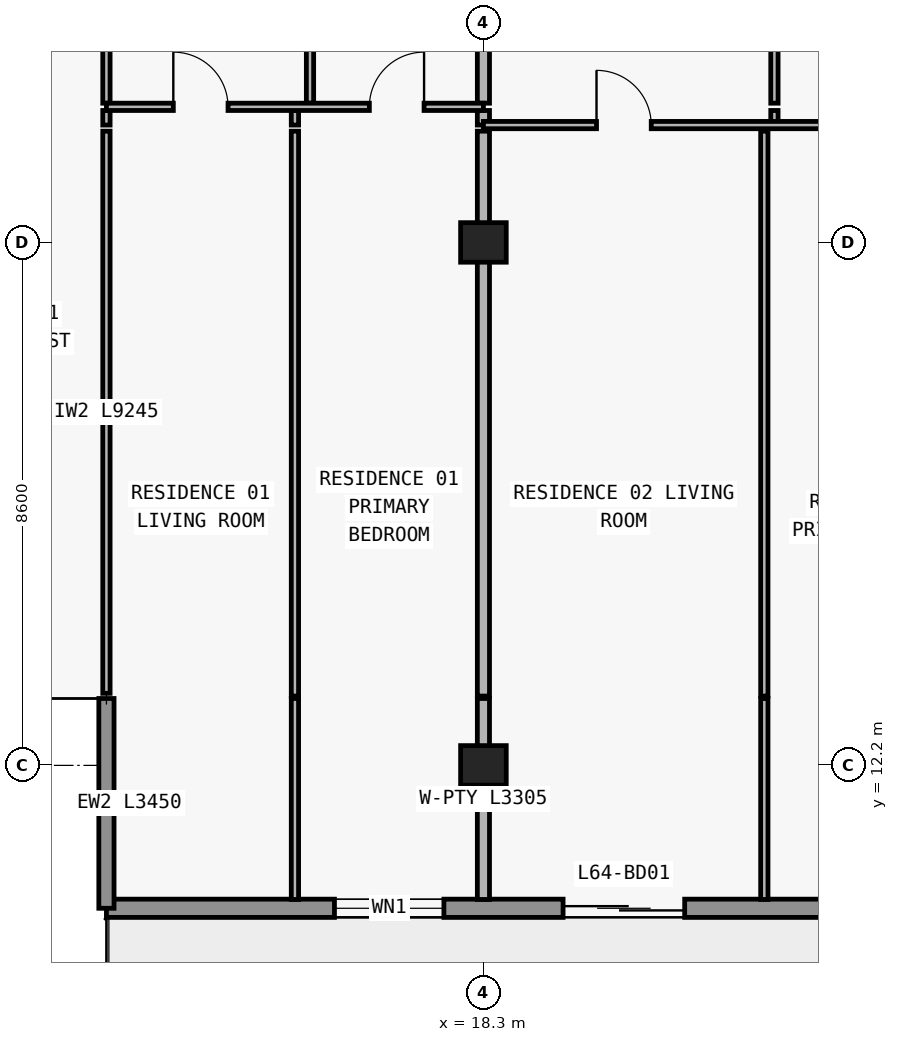
"""IFC4 building model, lengths in metres.
Left out: names, types, materials, properties, quantities, classifications, styles, units other than length and angle.
Written with IfcOpenShell. Run it as: python <this file> out.ifc"""

import sys

from ifc_helpers import new_model, si_unit, direction, frame, frame_2d, origin, origin_2d, place, context, subcontext, project, spatial, rectangle, extrude, element, fill, save


model = new_model("IFC4")
c1 = context("Model", 3, precision=1e-05, world=origin(), true_north=direction((0.0, 1.0)))
c2 = subcontext(c1, "Body", "Model", "MODEL_VIEW")
j1 = project(units=[si_unit("LENGTHUNIT", "METRE"), si_unit("PLANEANGLEUNIT", "RADIAN")], contexts=[c1])
p1 = place(None, origin())
s1 = spatial("IfcSite", under=j1, at=p1, CompositionType="ELEMENT")
p2 = place(p1, origin())
s2 = spatial("IfcBuilding", under=s1, at=p2, CompositionType="ELEMENT")
p3 = place(p2, frame((0.0, 0.0, 229.8)))
s3 = spatial("IfcBuildingStorey", under=s2, at=p3, CompositionType="ELEMENT", Elevation=229.8)
for number, where, z_axis, x_axis in (
    (1, (18.3, 12.2, 0.0), (0.0, 0.0, 1.0), (1.0, 0.0, 0.0)),
    (2, (18.3, 20.8, 0.0), (0.0, 0.0, 1.0), (1.0, 0.0, 0.0)),
):
    element("IfcColumn", number, at=place(p3, frame(where, z_axis=z_axis, x_axis=x_axis)), inside=s3, PredefinedType="COLUMN", context=c2, shape_type="SweptSolid", body=[
        extrude(rectangle(XDim=0.75, YDim=0.65, at=origin_2d()), origin(), (0.0, 0.0, 1.0), 3.05),
    ])
p4 = place(p3, frame((65.7, 9.85, 0.0), z_axis=(0.0, 0.0, 1.0), x_axis=(-1.0, 0.0, 0.0)))
e3 = element("IfcWall", 3, at=p4, inside=s3, PredefinedType="STANDARD", context=c2, shape_type="SweptSolid", body=[
    extrude(rectangle(XDim=53.6, YDim=0.3, at=frame_2d((26.8, 0.0))), origin(), (0.0, 0.0, 1.0), 3.05),
])
p5 = place(p4, frame((48.05, 0.0, 0.85)))
e4 = element("IfcOpeningElement", 4, at=p5, cuts=e3, PredefinedType="OPENING", context=c2, shape_type="SweptSolid", body=[
    extrude(rectangle(XDim=1.8, YDim=1.55, at=frame_2d((0.9, 0.775))), frame((0.0, 0.16, 0.0), z_axis=(0.0, -1.0, 0.0), x_axis=(1.0, 0.0, 0.0)), (0.0, 0.0, 1.0), 0.32),
])
p6 = place(p4, frame((44.09, 0.0, 0.0)))
e5 = element("IfcOpeningElement", 5, at=p6, cuts=e3, PredefinedType="OPENING", context=c2, shape_type="SweptSolid", body=[
    extrude(rectangle(XDim=2.0, YDim=2.3, at=frame_2d((1.0, 1.15))), frame((0.0, 0.16, 0.0), z_axis=(0.0, -1.0, 0.0), x_axis=(1.0, 0.0, 0.0)), (0.0, 0.0, 1.0), 0.32),
])
p7 = place(p4, frame((39.99, 0.0, 0.85)))
e6 = element("IfcOpeningElement", 6, at=p7, cuts=e3, PredefinedType="OPENING", context=c2, shape_type="SweptSolid", body=[
    extrude(rectangle(XDim=1.8, YDim=1.55, at=frame_2d((0.9, 0.775))), frame((0.0, 0.16, 0.0), z_axis=(0.0, -1.0, 0.0), x_axis=(1.0, 0.0, 0.0)), (0.0, 0.0, 1.0), 0.32),
])
p8 = place(p4, frame((36.026, 0.0, 0.0)))
e7 = element("IfcOpeningElement", 7, at=p8, cuts=e3, PredefinedType="OPENING", context=c2, shape_type="SweptSolid", body=[
    extrude(rectangle(XDim=2.0, YDim=2.3, at=frame_2d((1.0, 1.15))), frame((0.0, 0.16, 0.0), z_axis=(0.0, -1.0, 0.0), x_axis=(1.0, 0.0, 0.0)), (0.0, 0.0, 1.0), 0.32),
])
p9 = place(p4, frame((31.726, 0.0, 0.85)))
e8 = element("IfcOpeningElement", 8, at=p9, cuts=e3, PredefinedType="OPENING", context=c2, shape_type="SweptSolid", body=[
    extrude(rectangle(XDim=2.2, YDim=1.55, at=frame_2d((1.1, 0.775))), frame((0.0, 0.16, 0.0), z_axis=(0.0, -1.0, 0.0), x_axis=(1.0, 0.0, 0.0)), (0.0, 0.0, 1.0), 0.32),
])
p10 = place(p4, frame((27.51, 0.0, 0.0)))
e9 = element("IfcOpeningElement", 9, at=p10, cuts=e3, PredefinedType="OPENING", context=c2, shape_type="SweptSolid", body=[
    extrude(rectangle(XDim=2.0, YDim=2.3, at=frame_2d((1.0, 1.15))), frame((0.0, 0.16, 0.0), z_axis=(0.0, -1.0, 0.0), x_axis=(1.0, 0.0, 0.0)), (0.0, 0.0, 1.0), 0.32),
])
p11 = place(p4, frame((23.81, 0.0, 0.85)))
e10 = element("IfcOpeningElement", 10, at=p11, cuts=e3, PredefinedType="OPENING", context=c2, shape_type="SweptSolid", body=[
    extrude(rectangle(XDim=1.8, YDim=1.55, at=frame_2d((0.9, 0.775))), frame((0.0, 0.16, 0.0), z_axis=(0.0, -1.0, 0.0), x_axis=(1.0, 0.0, 0.0)), (0.0, 0.0, 1.0), 0.32),
])
p12 = place(p4, frame((20.026, 0.0, 0.0)))
e11 = element("IfcOpeningElement", 11, at=p12, cuts=e3, PredefinedType="OPENING", context=c2, shape_type="SweptSolid", body=[
    extrude(rectangle(XDim=2.0, YDim=2.3, at=frame_2d((1.0, 1.15))), frame((0.0, 0.16, 0.0), z_axis=(0.0, -1.0, 0.0), x_axis=(1.0, 0.0, 0.0)), (0.0, 0.0, 1.0), 0.32),
])
p13 = place(p4, frame((15.726, 0.0, 0.85)))
e12 = element("IfcOpeningElement", 12, at=p13, cuts=e3, PredefinedType="OPENING", context=c2, shape_type="SweptSolid", body=[
    extrude(rectangle(XDim=2.2, YDim=1.55, at=frame_2d((1.1, 0.775))), frame((0.0, 0.16, 0.0), z_axis=(0.0, -1.0, 0.0), x_axis=(1.0, 0.0, 0.0)), (0.0, 0.0, 1.0), 0.32),
])
p14 = place(p4, frame((11.29, 0.0, 0.0)))
e13 = element("IfcOpeningElement", 13, at=p14, cuts=e3, PredefinedType="OPENING", context=c2, shape_type="SweptSolid", body=[
    extrude(rectangle(XDim=2.0, YDim=2.3, at=frame_2d((1.0, 1.15))), frame((0.0, 0.16, 0.0), z_axis=(0.0, -1.0, 0.0), x_axis=(1.0, 0.0, 0.0)), (0.0, 0.0, 1.0), 0.32),
])
p15 = place(p4, frame((7.19, 0.0, 0.85)))
e14 = element("IfcOpeningElement", 14, at=p15, cuts=e3, PredefinedType="OPENING", context=c2, shape_type="SweptSolid", body=[
    extrude(rectangle(XDim=1.8, YDim=1.55, at=frame_2d((0.9, 0.775))), frame((0.0, 0.16, 0.0), z_axis=(0.0, -1.0, 0.0), x_axis=(1.0, 0.0, 0.0)), (0.0, 0.0, 1.0), 0.32),
])
p16 = place(p4, frame((0.65, 0.0, 0.85)))
e15 = element("IfcOpeningElement", 15, at=p16, cuts=e3, PredefinedType="OPENING", context=c2, shape_type="SweptSolid", body=[
    extrude(rectangle(XDim=1.8, YDim=1.55, at=frame_2d((0.9, 0.775))), frame((0.0, 0.16, 0.0), z_axis=(0.0, -1.0, 0.0), x_axis=(1.0, 0.0, 0.0)), (0.0, 0.0, 1.0), 0.32),
])
p17 = place(p3, frame((12.1, 13.3, 0.0), z_axis=(0.0, 0.0, 1.0), x_axis=(0.0, -1.0, 0.0)))
e16 = element("IfcWall", 16, at=p17, inside=s3, PredefinedType="ELEMENTEDWALL", context=c2, shape_type="SweptSolid", body=[
    extrude(rectangle(XDim=3.45, YDim=0.25, at=frame_2d((1.725, 0.0))), origin(), (0.0, 0.0, 1.0), 3.05),
])
p18 = place(p3, frame((12.1, 13.385, 0.0), z_axis=(0.0, 0.0, 1.0), x_axis=(0.0, 1.0, 0.0)))
e17 = element("IfcWall", 17, at=p18, inside=s3, PredefinedType="PARTITIONING", context=c2, shape_type="SweptSolid", body=[
    extrude(rectangle(XDim=9.245, YDim=0.12, at=frame_2d((4.623, 0.0))), origin(), (0.0, 0.0, 1.0), 3.05),
])
p19 = place(p3, frame((12.1, 22.73, 0.0), z_axis=(0.0, 0.0, 1.0), x_axis=(0.0, 1.0, 0.0)))
e18 = element("IfcWall", 18, at=p19, inside=s3, PredefinedType="PARTITIONING", context=c2, shape_type="SweptSolid", body=[
    extrude(rectangle(XDim=0.24, YDim=0.12, at=frame_2d((0.12, 0.0))), origin(), (0.0, 0.0, 1.0), 3.05),
])
p20 = place(p3, frame((12.1, 23.09, 0.0), z_axis=(0.0, 0.0, 1.0), x_axis=(0.0, 1.0, 0.0)))
e19 = element("IfcWall", 19, at=p20, inside=s3, PredefinedType="PARTITIONING", context=c2, shape_type="SweptSolid", body=[
    extrude(rectangle(XDim=4.69, YDim=0.12, at=frame_2d((2.345, 0.0))), origin(), (0.0, 0.0, 1.0), 3.05),
])
p21 = place(p20, frame((1.895, 0.0, 0.0)))
e20 = element("IfcOpeningElement", 20, at=p21, cuts=e19, PredefinedType="OPENING", context=c2, shape_type="SweptSolid", body=[
    extrude(rectangle(XDim=0.9, YDim=2.15, at=frame_2d((0.45, 1.075))), frame((0.0, 0.07, 0.0), z_axis=(0.0, -1.0, 0.0), x_axis=(1.0, 0.0, 0.0)), (0.0, 0.0, 1.0), 0.14),
])
p22 = place(p3, frame((15.2, 9.995, 0.0), z_axis=(0.0, 0.0, 1.0), x_axis=(0.0, 1.0, 0.0)))
e21 = element("IfcWall", 21, at=p22, inside=s3, PredefinedType="PARTITIONING", context=c2, shape_type="SweptSolid", body=[
    extrude(rectangle(XDim=3.305, YDim=0.12, at=frame_2d((1.652, 0.0))), origin(), (0.0, 0.0, 1.0), 3.05),
])
p23 = place(p3, frame((15.2, 13.34, 0.0), z_axis=(0.0, 0.0, 1.0), x_axis=(0.0, 1.0, 0.0)))
e22 = element("IfcWall", 22, at=p23, inside=s3, PredefinedType="PARTITIONING", context=c2, shape_type="SweptSolid", body=[
    extrude(rectangle(XDim=9.29, YDim=0.12, at=frame_2d((4.645, 0.0))), origin(), (0.0, 0.0, 1.0), 3.05),
])
p24 = place(p3, frame((15.2, 22.73, 0.0), z_axis=(0.0, 0.0, 1.0), x_axis=(0.0, 1.0, 0.0)))
e23 = element("IfcWall", 23, at=p24, inside=s3, PredefinedType="PARTITIONING", context=c2, shape_type="SweptSolid", body=[
    extrude(rectangle(XDim=0.24, YDim=0.12, at=frame_2d((0.12, 0.0))), origin(), (0.0, 0.0, 1.0), 3.05),
])
p25 = place(p3, frame((15.448, 23.09, 0.0), z_axis=(0.0, 0.0, 1.0), x_axis=(0.0, 1.0, 0.0)))
e24 = element("IfcWall", 24, at=p25, inside=s3, PredefinedType="PARTITIONING", context=c2, shape_type="SweptSolid", body=[
    extrude(rectangle(XDim=4.69, YDim=0.12, at=frame_2d((2.345, 0.0))), origin(), (0.0, 0.0, 1.0), 2.725),
])
p26 = place(p25, frame((1.895, 0.0, 0.0)))
e25 = element("IfcOpeningElement", 25, at=p26, cuts=e24, PredefinedType="OPENING", context=c2, shape_type="SweptSolid", body=[
    extrude(rectangle(XDim=0.9, YDim=2.15, at=frame_2d((0.45, 1.075))), frame((0.0, 0.07, 0.0), z_axis=(0.0, -1.0, 0.0), x_axis=(1.0, 0.0, 0.0)), (0.0, 0.0, 1.0), 0.14),
])
p27 = place(p3, frame((18.3, 9.995, 0.0), z_axis=(0.0, 0.0, 1.0), x_axis=(0.0, 1.0, 0.0)))
e26 = element("IfcWall", 26, at=p27, inside=s3, PredefinedType="PARTITIONING", context=c2, shape_type="SweptSolid", body=[
    extrude(rectangle(XDim=3.305, YDim=0.2, at=frame_2d((1.652, 0.0))), origin(), (0.0, 0.0, 1.0), 2.263),
])
p28 = place(p3, frame((18.3, 13.34, 0.0), z_axis=(0.0, 0.0, 1.0), x_axis=(0.0, 1.0, 0.0)))
e27 = element("IfcWall", 27, at=p28, inside=s3, PredefinedType="PARTITIONING", context=c2, shape_type="SweptSolid", body=[
    extrude(rectangle(XDim=9.29, YDim=0.2, at=frame_2d((4.645, 0.0))), origin(), (0.0, 0.0, 1.0), 2.263),
])
p29 = place(p3, frame((18.3, 22.73, 0.0), z_axis=(0.0, 0.0, 1.0), x_axis=(0.0, 1.0, 0.0)))
e28 = element("IfcWall", 28, at=p29, inside=s3, PredefinedType="PARTITIONING", context=c2, shape_type="SweptSolid", body=[
    extrude(rectangle(XDim=0.24, YDim=0.2, at=frame_2d((0.12, 0.0))), origin(), (0.0, 0.0, 1.0), 2.263),
])
p30 = place(p3, frame((18.3, 23.09, 0.0), z_axis=(0.0, 0.0, 1.0), x_axis=(0.0, 1.0, 0.0)))
e29 = element("IfcWall", 29, at=p30, inside=s3, PredefinedType="PARTITIONING", context=c2, shape_type="SweptSolid", body=[
    extrude(rectangle(XDim=4.69, YDim=0.2, at=frame_2d((2.345, 0.0))), origin(), (0.0, 0.0, 1.0), 2.263),
])
p31 = place(p3, frame((22.92, 9.995, 0.0), z_axis=(0.0, 0.0, 1.0), x_axis=(0.0, 1.0, 0.0)))
e30 = element("IfcWall", 30, at=p31, inside=s3, PredefinedType="PARTITIONING", context=c2, shape_type="SweptSolid", body=[
    extrude(rectangle(XDim=3.305, YDim=0.12, at=frame_2d((1.652, 0.0))), origin(), (0.0, 0.0, 1.0), 3.05),
])
p32 = place(p3, frame((22.92, 13.34, 0.0), z_axis=(0.0, 0.0, 1.0), x_axis=(0.0, 1.0, 0.0)))
e31 = element("IfcWall", 31, at=p32, inside=s3, PredefinedType="PARTITIONING", context=c2, shape_type="SweptSolid", body=[
    extrude(rectangle(XDim=9.29, YDim=0.12, at=frame_2d((4.645, 0.0))), origin(), (0.0, 0.0, 1.0), 3.05),
])
p33 = place(p3, frame((23.086, 22.73, 0.0), z_axis=(0.0, 0.0, 1.0), x_axis=(0.0, 1.0, 0.0)))
e32 = element("IfcWall", 32, at=p33, inside=s3, PredefinedType="PARTITIONING", context=c2, shape_type="SweptSolid", body=[
    extrude(rectangle(XDim=0.24, YDim=0.12, at=frame_2d((0.12, 0.0))), origin(), (0.0, 0.0, 1.0), 3.05),
])
p34 = place(p3, frame((23.086, 23.09, 0.0), z_axis=(0.0, 0.0, 1.0), x_axis=(0.0, 1.0, 0.0)))
e33 = element("IfcWall", 33, at=p34, inside=s3, PredefinedType="PARTITIONING", context=c2, shape_type="SweptSolid", body=[
    extrude(rectangle(XDim=4.69, YDim=0.12, at=frame_2d((2.345, 0.0))), origin(), (0.0, 0.0, 1.0), 3.05),
])
p35 = place(p34, frame((1.895, 0.0, 0.0)))
e34 = element("IfcOpeningElement", 34, at=p35, cuts=e33, PredefinedType="OPENING", context=c2, shape_type="SweptSolid", body=[
    extrude(rectangle(XDim=0.9, YDim=2.15, at=frame_2d((0.45, 1.075))), frame((0.0, 0.07, 0.0), z_axis=(0.0, -1.0, 0.0), x_axis=(1.0, 0.0, 0.0)), (0.0, 0.0, 1.0), 0.14),
])
p36 = place(p3, frame((18.3, 22.73, 0.0), z_axis=(0.0, 0.0, 1.0), x_axis=(1.0, 0.0, 0.0)))
e35 = element("IfcWall", 35, at=p36, inside=s3, PredefinedType="PARTITIONING", context=c2, shape_type="SweptSolid", body=[
    extrude(rectangle(XDim=8.18, YDim=0.12, at=frame_2d((4.09, 0.0))), origin(), (0.0, 0.0, 1.0), 3.05),
])
p37 = place(p36, frame((1.86, 0.0, 0.0)))
e36 = element("IfcOpeningElement", 36, at=p37, cuts=e35, PredefinedType="OPENING", context=c2, shape_type="SweptSolid", body=[
    extrude(rectangle(XDim=0.9, YDim=2.15, at=frame_2d((0.45, 1.075))), frame((0.0, 0.07, 0.0), z_axis=(0.0, -1.0, 0.0), x_axis=(1.0, 0.0, 0.0)), (0.0, 0.0, 1.0), 0.14),
])
p38 = place(p36, frame((6.033, 0.0, 0.0)))
e37 = element("IfcOpeningElement", 37, at=p38, cuts=e35, PredefinedType="OPENING", context=c2, shape_type="SweptSolid", body=[
    extrude(rectangle(XDim=0.9, YDim=2.15, at=frame_2d((0.45, 1.075))), frame((0.0, 0.07, 0.0), z_axis=(0.0, -1.0, 0.0), x_axis=(1.0, 0.0, 0.0)), (0.0, 0.0, 1.0), 0.14),
])
p39 = place(p3, frame((12.1, 23.03, 0.0), z_axis=(0.0, 0.0, 1.0), x_axis=(1.0, 0.0, 0.0)))
e38 = element("IfcWall", 38, at=p39, inside=s3, PredefinedType="PARTITIONING", context=c2, shape_type="SweptSolid", body=[
    extrude(rectangle(XDim=6.2, YDim=0.12, at=frame_2d((3.1, 0.0))), origin(), (0.0, 0.0, 1.0), 3.05),
])
p40 = place(p39, frame((1.1, 0.0, 0.0)))
e39 = element("IfcOpeningElement", 39, at=p40, cuts=e38, PredefinedType="OPENING", context=c2, shape_type="SweptSolid", body=[
    extrude(rectangle(XDim=0.9, YDim=2.15, at=frame_2d((0.45, 1.075))), frame((0.0, 0.07, 0.0), z_axis=(0.0, -1.0, 0.0), x_axis=(1.0, 0.0, 0.0)), (0.0, 0.0, 1.0), 0.14),
])
p41 = place(p39, frame((4.324, 0.0, 0.0)))
e40 = element("IfcOpeningElement", 40, at=p41, cuts=e38, PredefinedType="OPENING", context=c2, shape_type="SweptSolid", body=[
    extrude(rectangle(XDim=0.9, YDim=2.15, at=frame_2d((0.45, 1.075))), frame((0.0, 0.07, 0.0), z_axis=(0.0, -1.0, 0.0), x_axis=(1.0, 0.0, 0.0)), (0.0, 0.0, 1.0), 0.14),
])
p42 = place(p5, origin())
e41 = element("IfcWindow", 41, at=p42, inside=s3, PartitioningType="SINGLE_PANEL", PredefinedType="WINDOW", context=c2, shape_type="SweptSolid", body=[
    extrude(rectangle(XDim=1.8, YDim=1.55, at=frame_2d((0.9, 0.775))), frame((0.0, 0.03, 0.0), z_axis=(0.0, -1.0, 0.0), x_axis=(1.0, 0.0, 0.0)), (0.0, 0.0, 1.0), 0.06),
])
fill(e4, e41)
p43 = place(p6, origin())
e42 = element("IfcDoor", 42, at=p43, inside=s3, OperationType="DOUBLE_DOOR_SLIDING", PredefinedType="DOOR", context=c2, shape_type="SweptSolid", body=[
    extrude(rectangle(XDim=2.0, YDim=2.3, at=frame_2d((1.0, 1.15))), frame((0.0, 0.025, 0.0), z_axis=(0.0, -1.0, 0.0), x_axis=(1.0, 0.0, 0.0)), (0.0, 0.0, 1.0), 0.05),
])
fill(e5, e42)
p44 = place(p40, origin())
e43 = element("IfcDoor", 43, at=p44, inside=s3, OperationType="SINGLE_SWING_LEFT", PredefinedType="DOOR", context=c2, shape_type="SweptSolid", body=[
    extrude(rectangle(XDim=0.9, YDim=2.15, at=frame_2d((0.45, 1.075))), frame((0.0, 0.025, 0.0), z_axis=(0.0, -1.0, 0.0), x_axis=(1.0, 0.0, 0.0)), (0.0, 0.0, 1.0), 0.05),
])
fill(e39, e43)
p45 = place(p41, origin())
e44 = element("IfcDoor", 44, at=p45, inside=s3, OperationType="SINGLE_SWING_RIGHT", PredefinedType="DOOR", context=c2, shape_type="SweptSolid", body=[
    extrude(rectangle(XDim=0.9, YDim=2.15, at=frame_2d((0.45, 1.075))), frame((0.0, 0.025, 0.0), z_axis=(0.0, -1.0, 0.0), x_axis=(1.0, 0.0, 0.0)), (0.0, 0.0, 1.0), 0.05),
])
fill(e40, e44)
p46 = place(p37, origin())
e45 = element("IfcDoor", 45, at=p46, inside=s3, OperationType="SINGLE_SWING_LEFT", PredefinedType="DOOR", context=c2, shape_type="SweptSolid", body=[
    extrude(rectangle(XDim=0.9, YDim=2.15, at=frame_2d((0.45, 1.075))), frame((0.0, 0.025, 0.0), z_axis=(0.0, -1.0, 0.0), x_axis=(1.0, 0.0, 0.0)), (0.0, 0.0, 1.0), 0.05),
])
fill(e36, e45)
save(model, sys.argv[1])
